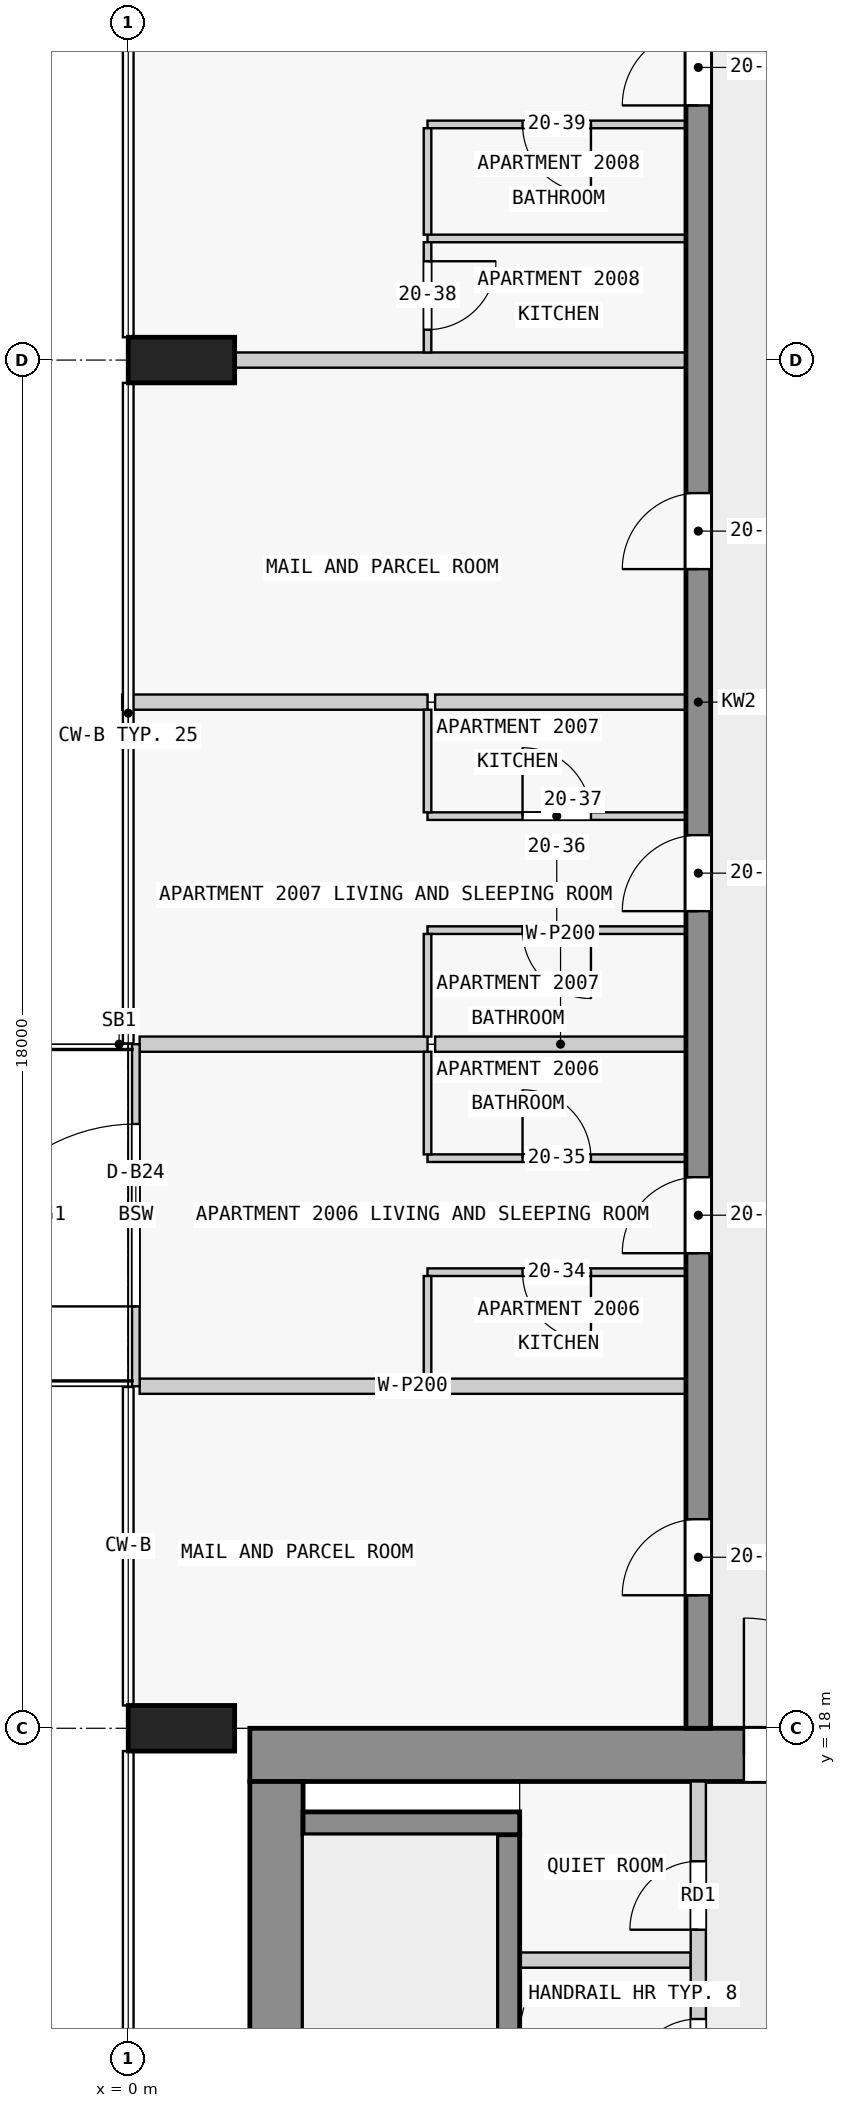
"""IFC4 building model, lengths in metres.
Left out: names, types, materials, properties, quantities, classifications, styles, units other than length and angle.
Written with IfcOpenShell. Run it as: python <this file> out.ifc"""

import sys

from ifc_helpers import new_model, si_unit, direction, frame, frame_2d, origin, origin_2d, place, context, subcontext, project, spatial, rectangle, extrude, element, fill, save


model = new_model("IFC4")
c1 = context("Model", 3, precision=1e-05, world=origin(), true_north=direction((0.0, 1.0)))
c2 = subcontext(c1, "Body", "Model", "MODEL_VIEW")
j1 = project(units=[si_unit("LENGTHUNIT", "METRE"), si_unit("PLANEANGLEUNIT", "RADIAN")], contexts=[c1])
p1 = place(None, origin())
s1 = spatial("IfcSite", under=j1, at=p1, CompositionType="ELEMENT")
p2 = place(p1, origin())
s2 = spatial("IfcBuilding", under=s1, at=p2, CompositionType="ELEMENT")
p3 = place(p2, frame((0.0, 0.0, 81.8)))
s3 = spatial("IfcBuildingStorey", under=s2, at=p3, CompositionType="ELEMENT", Elevation=81.8)
for number, where, z_axis, x_axis in (
    (1, (0.7, 36.0, 0.0), (0.0, 0.0, 1.0), (0.0, 1.0, 0.0)),
    (2, (0.7, 18.0, 0.0), (0.0, 0.0, 1.0), (0.0, 1.0, 0.0)),
):
    element("IfcColumn", number, at=place(p3, frame(where, z_axis=z_axis, x_axis=x_axis)), inside=s3, PredefinedType="COLUMN", context=c2, shape_type="SweptSolid", body=[
        extrude(rectangle(XDim=0.6, YDim=1.4, at=origin_2d()), origin(), (0.0, 0.0, 1.0), 3.5),
    ])
p4 = place(p3, frame((1.6, 17.65, 0.0), z_axis=(0.0, 0.0, 1.0), x_axis=(1.0, 0.0, 0.0)))
e3 = element("IfcWall", 3, at=p4, inside=s3, PredefinedType="SHEAR", context=c2, shape_type="SweptSolid", body=[
    extrude(rectangle(XDim=20.9, YDim=0.7, at=frame_2d((10.45, 0.0))), origin(), (0.0, 0.0, 1.0), 3.25),
])
p5 = place(p4, frame((6.5, 0.0, 0.0)))
e4 = element("IfcOpeningElement", 4, at=p5, cuts=e3, PredefinedType="OPENING", context=c2, shape_type="SweptSolid", body=[
    extrude(rectangle(XDim=1.8, YDim=2.1, at=frame_2d((0.9, 1.05))), frame((0.0, 0.36, 0.0), z_axis=(0.0, -1.0, 0.0), x_axis=(1.0, 0.0, 0.0)), (0.0, 0.0, 1.0), 0.72),
])
p6 = place(p3, frame((1.95, 2.5, 0.0), z_axis=(0.0, 0.0, 1.0), x_axis=(0.0, 1.0, 0.0)))
e5 = element("IfcWall", 5, at=p6, inside=s3, PredefinedType="SHEAR", context=c2, shape_type="SweptSolid", body=[
    extrude(rectangle(XDim=14.8, YDim=0.7, at=frame_2d((7.4, 0.0))), origin(), (0.0, 0.0, 1.0), 3.25),
])
p7 = place(p3, frame((5.0, 10.2, 0.0), z_axis=(0.0, 0.0, 1.0), x_axis=(0.0, 1.0, 0.0)))
e6 = element("IfcWall", 6, at=p7, inside=s3, PredefinedType="SHEAR", context=c2, shape_type="SweptSolid", body=[
    extrude(rectangle(XDim=6.4, YDim=0.3, at=frame_2d((3.2, 0.0))), origin(), (0.0, 0.0, 1.0), 3.25),
])
p8 = place(p3, frame((2.3, 16.75, 0.0), z_axis=(0.0, 0.0, 1.0), x_axis=(1.0, 0.0, 0.0)))
e7 = element("IfcWall", 7, at=p8, inside=s3, PredefinedType="SHEAR", context=c2, shape_type="SweptSolid", body=[
    extrude(rectangle(XDim=2.85, YDim=0.3, at=frame_2d((1.425, 0.0))), origin(), (0.0, 0.0, 1.0), 3.25),
])
p9 = place(p3, frame((7.5, 18.0, 0.0), z_axis=(0.0, 0.0, 1.0), x_axis=(0.0, 1.0, 0.0)))
e8 = element("IfcWall", 8, at=p9, inside=s3, PredefinedType="SHEAR", context=c2, shape_type="SweptSolid", body=[
    extrude(rectangle(XDim=27.0, YDim=0.325, at=frame_2d((13.5, 0.0))), origin(), (0.0, 0.0, 1.0), 3.25),
])
p10 = place(p9, frame((1.75, 0.0, 0.0)))
e9 = element("IfcOpeningElement", 9, at=p10, cuts=e8, PredefinedType="OPENING", context=c2, shape_type="SweptSolid", body=[
    extrude(rectangle(XDim=1.0, YDim=2.1, at=frame_2d((0.5, 1.05))), frame((0.0, 0.172, 0.0), z_axis=(0.0, -1.0, 0.0), x_axis=(1.0, 0.0, 0.0)), (0.0, 0.0, 1.0), 0.345),
])
p11 = place(p9, frame((6.25, 0.0, 0.0)))
e10 = element("IfcOpeningElement", 10, at=p11, cuts=e8, PredefinedType="OPENING", context=c2, shape_type="SweptSolid", body=[
    extrude(rectangle(XDim=1.0, YDim=2.1, at=frame_2d((0.5, 1.05))), frame((0.0, 0.172, 0.0), z_axis=(0.0, -1.0, 0.0), x_axis=(1.0, 0.0, 0.0)), (0.0, 0.0, 1.0), 0.345),
])
p12 = place(p9, frame((10.75, 0.0, 0.0)))
e11 = element("IfcOpeningElement", 11, at=p12, cuts=e8, PredefinedType="OPENING", context=c2, shape_type="SweptSolid", body=[
    extrude(rectangle(XDim=1.0, YDim=2.1, at=frame_2d((0.5, 1.05))), frame((0.0, 0.172, 0.0), z_axis=(0.0, -1.0, 0.0), x_axis=(1.0, 0.0, 0.0)), (0.0, 0.0, 1.0), 0.345),
])
p13 = place(p9, frame((15.25, 0.0, 0.0)))
e12 = element("IfcOpeningElement", 12, at=p13, cuts=e8, PredefinedType="OPENING", context=c2, shape_type="SweptSolid", body=[
    extrude(rectangle(XDim=1.0, YDim=2.1, at=frame_2d((0.5, 1.05))), frame((0.0, 0.172, 0.0), z_axis=(0.0, -1.0, 0.0), x_axis=(1.0, 0.0, 0.0)), (0.0, 0.0, 1.0), 0.345),
])
p14 = place(p9, frame((21.35, 0.0, 0.0)))
e13 = element("IfcOpeningElement", 13, at=p14, cuts=e8, PredefinedType="OPENING", context=c2, shape_type="SweptSolid", body=[
    extrude(rectangle(XDim=1.0, YDim=2.1, at=frame_2d((0.5, 1.05))), frame((0.0, 0.172, 0.0), z_axis=(0.0, -1.0, 0.0), x_axis=(1.0, 0.0, 0.0)), (0.0, 0.0, 1.0), 0.345),
])
p15 = place(p3, frame((0.1, 22.5, 0.0), z_axis=(0.0, 0.0, 1.0), x_axis=(0.0, 1.0, 0.0)))
e14 = element("IfcWall", 14, at=p15, inside=s3, PredefinedType="STANDARD", context=c2, shape_type="SweptSolid", body=[
    extrude(rectangle(XDim=4.5, YDim=0.1, at=frame_2d((2.25, 0.0))), origin(), (0.0, 0.0, 1.0), 3.25),
])
p16 = place(p15, frame((1.05, 0.0, 0.0)))
e15 = element("IfcOpeningElement", 15, at=p16, cuts=e14, PredefinedType="OPENING", context=c2, shape_type="SweptSolid", body=[
    extrude(rectangle(XDim=2.4, YDim=2.4, at=frame_2d((1.2, 1.2))), frame((0.0, 0.06, 0.0), z_axis=(0.0, -1.0, 0.0), x_axis=(1.0, 0.0, 0.0)), (0.0, 0.0, 1.0), 0.12),
])
p17 = place(p3, frame((7.5, 10.1, 0.0), z_axis=(0.0, 0.0, 1.0), x_axis=(0.0, 1.0, 0.0)))
e16 = element("IfcWall", 16, at=p17, inside=s3, PredefinedType="PARTITIONING", context=c2, shape_type="SweptSolid", body=[
    extrude(rectangle(XDim=7.2, YDim=0.2, at=frame_2d((3.6, 0.0))), origin(), (0.0, 0.0, 1.0), 3.25),
])
p18 = place(p17, frame((0.75, 0.0, 0.0)))
e17 = element("IfcOpeningElement", 17, at=p18, cuts=e16, PredefinedType="OPENING", context=c2, shape_type="SweptSolid", body=[
    extrude(rectangle(XDim=0.9, YDim=2.1, at=frame_2d((0.45, 1.05))), frame((0.0, 0.11, 0.0), z_axis=(0.0, -1.0, 0.0), x_axis=(1.0, 0.0, 0.0)), (0.0, 0.0, 1.0), 0.22),
])
p19 = place(p17, frame((3.175, 0.0, 0.0)))
e18 = element("IfcOpeningElement", 18, at=p19, cuts=e16, PredefinedType="OPENING", context=c2, shape_type="SweptSolid", body=[
    extrude(rectangle(XDim=0.9, YDim=2.1, at=frame_2d((0.45, 1.05))), frame((0.0, 0.11, 0.0), z_axis=(0.0, -1.0, 0.0), x_axis=(1.0, 0.0, 0.0)), (0.0, 0.0, 1.0), 0.22),
])
p20 = place(p17, frame((5.25, 0.0, 0.0)))
e19 = element("IfcOpeningElement", 19, at=p20, cuts=e16, PredefinedType="OPENING", context=c2, shape_type="SweptSolid", body=[
    extrude(rectangle(XDim=0.9, YDim=2.1, at=frame_2d((0.45, 1.05))), frame((0.0, 0.11, 0.0), z_axis=(0.0, -1.0, 0.0), x_axis=(1.0, 0.0, 0.0)), (0.0, 0.0, 1.0), 0.22),
])
p21 = place(p3, frame((5.15, 14.95, 0.0), z_axis=(0.0, 0.0, 1.0), x_axis=(1.0, 0.0, 0.0)))
e20 = element("IfcWall", 20, at=p21, inside=s3, PredefinedType="PARTITIONING", context=c2, shape_type="SweptSolid", body=[
    extrude(rectangle(XDim=2.25, YDim=0.2, at=frame_2d((1.125, 0.0))), origin(), (0.0, 0.0, 1.0), 3.25),
])
p22 = place(p3, frame((7.337, 22.5, 0.0), z_axis=(0.0, 0.0, 1.0), x_axis=(-1.0, 0.0, 0.0)))
e21 = element("IfcWall", 21, at=p22, inside=s3, PredefinedType="PARTITIONING", context=c2, shape_type="SweptSolid", body=[
    extrude(rectangle(XDim=7.188, YDim=0.2, at=frame_2d((3.594, 0.0))), origin(), (0.0, 0.0, 1.0), 3.25),
])
p23 = place(p3, frame((7.337, 24.0, 0.0), z_axis=(0.0, 0.0, 1.0), x_axis=(-1.0, 0.0, 0.0)))
e22 = element("IfcWall", 22, at=p23, inside=s3, PredefinedType="PARTITIONING", context=c2, shape_type="SweptSolid", body=[
    extrude(rectangle(XDim=3.4, YDim=0.1, at=frame_2d((1.7, 0.0))), origin(), (0.0, 0.0, 1.0), 3.25),
])
p24 = place(p23, frame((1.25, 0.0, 0.0)))
e23 = element("IfcOpeningElement", 23, at=p24, cuts=e22, PredefinedType="OPENING", context=c2, shape_type="SweptSolid", body=[
    extrude(rectangle(XDim=0.9, YDim=2.1, at=frame_2d((0.45, 1.05))), frame((0.0, 0.06, 0.0), z_axis=(0.0, -1.0, 0.0), x_axis=(1.0, 0.0, 0.0)), (0.0, 0.0, 1.0), 0.12),
])
p25 = place(p3, frame((3.938, 25.5, 0.0), z_axis=(0.0, 0.0, 1.0), x_axis=(1.0, 0.0, 0.0)))
e24 = element("IfcWall", 24, at=p25, inside=s3, PredefinedType="PARTITIONING", context=c2, shape_type="SweptSolid", body=[
    extrude(rectangle(XDim=3.4, YDim=0.1, at=frame_2d((1.7, 0.0))), origin(), (0.0, 0.0, 1.0), 3.25),
])
p26 = place(p25, frame((1.25, 0.0, 0.0)))
e25 = element("IfcOpeningElement", 25, at=p26, cuts=e24, PredefinedType="OPENING", context=c2, shape_type="SweptSolid", body=[
    extrude(rectangle(XDim=0.9, YDim=2.1, at=frame_2d((0.45, 1.05))), frame((0.0, 0.06, 0.0), z_axis=(0.0, -1.0, 0.0), x_axis=(1.0, 0.0, 0.0)), (0.0, 0.0, 1.0), 0.12),
])
p27 = place(p3, frame((7.337, 27.0, 0.0), z_axis=(0.0, 0.0, 1.0), x_axis=(-1.0, 0.0, 0.0)))
e26 = element("IfcWall", 26, at=p27, inside=s3, PredefinedType="PARTITIONING", context=c2, shape_type="SweptSolid", body=[
    extrude(rectangle(XDim=3.3, YDim=0.2, at=frame_2d((1.65, 0.0))), origin(), (0.0, 0.0, 1.0), 3.25),
])
p28 = place(p3, frame((0.15, 27.0, 0.0), z_axis=(0.0, 0.0, 1.0), x_axis=(1.0, 0.0, 0.0)))
e27 = element("IfcWall", 27, at=p28, inside=s3, PredefinedType="PARTITIONING", context=c2, shape_type="SweptSolid", body=[
    extrude(rectangle(XDim=3.788, YDim=0.2, at=frame_2d((1.894, 0.0))), origin(), (0.0, 0.0, 1.0), 3.25),
])
p29 = place(p3, frame((7.337, 28.5, 0.0), z_axis=(0.0, 0.0, 1.0), x_axis=(-1.0, 0.0, 0.0)))
e28 = element("IfcWall", 28, at=p29, inside=s3, PredefinedType="PARTITIONING", context=c2, shape_type="SweptSolid", body=[
    extrude(rectangle(XDim=3.4, YDim=0.1, at=frame_2d((1.7, 0.0))), origin(), (0.0, 0.0, 1.0), 3.25),
])
p30 = place(p29, frame((1.25, 0.0, 0.0)))
e29 = element("IfcOpeningElement", 29, at=p30, cuts=e28, PredefinedType="OPENING", context=c2, shape_type="SweptSolid", body=[
    extrude(rectangle(XDim=0.9, YDim=2.1, at=frame_2d((0.45, 1.05))), frame((0.0, 0.06, 0.0), z_axis=(0.0, -1.0, 0.0), x_axis=(1.0, 0.0, 0.0)), (0.0, 0.0, 1.0), 0.12),
])
p31 = place(p3, frame((3.938, 30.0, 0.0), z_axis=(0.0, 0.0, 1.0), x_axis=(1.0, 0.0, 0.0)))
e30 = element("IfcWall", 30, at=p31, inside=s3, PredefinedType="PARTITIONING", context=c2, shape_type="SweptSolid", body=[
    extrude(rectangle(XDim=3.4, YDim=0.1, at=frame_2d((1.7, 0.0))), origin(), (0.0, 0.0, 1.0), 3.25),
])
p32 = place(p31, frame((1.25, 0.0, 0.0)))
e31 = element("IfcOpeningElement", 31, at=p32, cuts=e30, PredefinedType="OPENING", context=c2, shape_type="SweptSolid", body=[
    extrude(rectangle(XDim=0.9, YDim=2.1, at=frame_2d((0.45, 1.05))), frame((0.0, 0.06, 0.0), z_axis=(0.0, -1.0, 0.0), x_axis=(1.0, 0.0, 0.0)), (0.0, 0.0, 1.0), 0.12),
])
p33 = place(p3, frame((7.337, 31.5, 0.0), z_axis=(0.0, 0.0, 1.0), x_axis=(-1.0, 0.0, 0.0)))
e32 = element("IfcWall", 32, at=p33, inside=s3, PredefinedType="PARTITIONING", context=c2, shape_type="SweptSolid", body=[
    extrude(rectangle(XDim=3.3, YDim=0.2, at=frame_2d((1.65, 0.0))), origin(), (0.0, 0.0, 1.0), 3.25),
])
p34 = place(p3, frame((-0.08, 31.5, 0.0), z_axis=(0.0, 0.0, 1.0), x_axis=(1.0, 0.0, 0.0)))
e33 = element("IfcWall", 33, at=p34, inside=s3, PredefinedType="PARTITIONING", context=c2, shape_type="SweptSolid", body=[
    extrude(rectangle(XDim=4.018, YDim=0.2, at=frame_2d((2.009, 0.0))), origin(), (0.0, 0.0, 1.0), 3.25),
])
p35 = place(p3, frame((7.337, 36.0, 0.0), z_axis=(0.0, 0.0, 1.0), x_axis=(-1.0, 0.0, 0.0)))
e34 = element("IfcWall", 34, at=p35, inside=s3, PredefinedType="PARTITIONING", context=c2, shape_type="SweptSolid", body=[
    extrude(rectangle(XDim=5.938, YDim=0.2, at=frame_2d((2.969, 0.0))), origin(), (0.0, 0.0, 1.0), 3.25),
])
p36 = place(p3, frame((7.337, 37.6, 0.0), z_axis=(0.0, 0.0, 1.0), x_axis=(-1.0, 0.0, 0.0)))
e35 = element("IfcWall", 35, at=p36, inside=s3, PredefinedType="PARTITIONING", context=c2, shape_type="SweptSolid", body=[
    extrude(rectangle(XDim=3.4, YDim=0.1, at=frame_2d((1.7, 0.0))), origin(), (0.0, 0.0, 1.0), 3.25),
])
p37 = place(p3, frame((7.337, 39.1, 0.0), z_axis=(0.0, 0.0, 1.0), x_axis=(-1.0, 0.0, 0.0)))
e36 = element("IfcWall", 36, at=p37, inside=s3, PredefinedType="PARTITIONING", context=c2, shape_type="SweptSolid", body=[
    extrude(rectangle(XDim=3.4, YDim=0.1, at=frame_2d((1.7, 0.0))), origin(), (0.0, 0.0, 1.0), 3.25),
])
p38 = place(p37, frame((1.25, 0.0, 0.0)))
e37 = element("IfcOpeningElement", 37, at=p38, cuts=e36, PredefinedType="OPENING", context=c2, shape_type="SweptSolid", body=[
    extrude(rectangle(XDim=0.9, YDim=2.1, at=frame_2d((0.45, 1.05))), frame((0.0, 0.06, 0.0), z_axis=(0.0, -1.0, 0.0), x_axis=(1.0, 0.0, 0.0)), (0.0, 0.0, 1.0), 0.12),
])
for number, where, z_axis, x_axis in (
    (38, (3.938, 23.95, 0.0), (0.0, 0.0, 1.0), (0.0, -1.0, 0.0)),
    (39, (3.938, 26.9, 0.0), (0.0, 0.0, 1.0), (0.0, -1.0, 0.0)),
    (40, (3.938, 28.45, 0.0), (0.0, 0.0, 1.0), (0.0, -1.0, 0.0)),
    (41, (3.938, 31.4, 0.0), (0.0, 0.0, 1.0), (0.0, -1.0, 0.0)),
):
    element("IfcWall", number, at=place(p3, frame(where, z_axis=z_axis, x_axis=x_axis)), inside=s3, PredefinedType="PARTITIONING", context=c2, shape_type="SweptSolid", body=[
        extrude(rectangle(XDim=1.35, YDim=0.1, at=frame_2d((0.675, 0.0))), origin(), (0.0, 0.0, 1.0), 3.25),
    ])
p39 = place(p3, frame((3.938, 37.55, 0.0), z_axis=(0.0, 0.0, 1.0), x_axis=(0.0, -1.0, 0.0)))
e42 = element("IfcWall", 42, at=p39, inside=s3, PredefinedType="PARTITIONING", context=c2, shape_type="SweptSolid", body=[
    extrude(rectangle(XDim=1.45, YDim=0.1, at=frame_2d((0.725, 0.0))), origin(), (0.0, 0.0, 1.0), 3.25),
])
p40 = place(p39, frame((0.25, 0.0, 0.0)))
e43 = element("IfcOpeningElement", 43, at=p40, cuts=e42, PredefinedType="OPENING", context=c2, shape_type="SweptSolid", body=[
    extrude(rectangle(XDim=0.9, YDim=2.1, at=frame_2d((0.45, 1.05))), frame((0.0, 0.06, 0.0), z_axis=(0.0, -1.0, 0.0), x_axis=(1.0, 0.0, 0.0)), (0.0, 0.0, 1.0), 0.12),
])
p41 = place(p3, frame((3.938, 39.05, 0.0), z_axis=(0.0, 0.0, 1.0), x_axis=(0.0, -1.0, 0.0)))
e44 = element("IfcWall", 44, at=p41, inside=s3, PredefinedType="PARTITIONING", context=c2, shape_type="SweptSolid", body=[
    extrude(rectangle(XDim=1.4, YDim=0.1, at=frame_2d((0.7, 0.0))), origin(), (0.0, 0.0, 1.0), 3.25),
])
p42 = place(p16, origin())
e45 = element("IfcDoor", 45, at=p42, inside=s3, OperationType="SINGLE_SWING_LEFT", PredefinedType="DOOR", context=c2, shape_type="SweptSolid", body=[
    extrude(rectangle(XDim=2.4, YDim=2.4, at=frame_2d((1.2, 1.2))), frame((0.0, 0.025, 0.0), z_axis=(0.0, -1.0, 0.0), x_axis=(1.0, 0.0, 0.0)), (0.0, 0.0, 1.0), 0.05),
])
fill(e15, e45)
p43 = place(p5, origin())
e46 = element("IfcDoor", 46, at=p43, inside=s3, OperationType="DOUBLE_DOOR_SINGLE_SWING", PredefinedType="DOOR", context=c2, shape_type="SweptSolid", body=[
    extrude(rectangle(XDim=1.8, YDim=2.1, at=frame_2d((0.9, 1.05))), frame((0.0, 0.025, 0.0), z_axis=(0.0, -1.0, 0.0), x_axis=(1.0, 0.0, 0.0)), (0.0, 0.0, 1.0), 0.05),
])
fill(e4, e46)
p44 = place(p19, origin())
e47 = element("IfcDoor", 47, at=p44, inside=s3, OperationType="SINGLE_SWING_RIGHT", PredefinedType="DOOR", context=c2, shape_type="SweptSolid", body=[
    extrude(rectangle(XDim=0.9, YDim=2.1, at=frame_2d((0.45, 1.05))), frame((0.0, 0.025, 0.0), z_axis=(0.0, -1.0, 0.0), x_axis=(1.0, 0.0, 0.0)), (0.0, 0.0, 1.0), 0.05),
])
fill(e18, e47)
p45 = place(p20, origin())
e48 = element("IfcDoor", 48, at=p45, inside=s3, OperationType="SINGLE_SWING_RIGHT", PredefinedType="DOOR", context=c2, shape_type="SweptSolid", body=[
    extrude(rectangle(XDim=0.9, YDim=2.1, at=frame_2d((0.45, 1.05))), frame((0.0, 0.025, 0.0), z_axis=(0.0, -1.0, 0.0), x_axis=(1.0, 0.0, 0.0)), (0.0, 0.0, 1.0), 0.05),
])
fill(e19, e48)
p46 = place(p10, origin())
e49 = element("IfcDoor", 49, at=p46, inside=s3, OperationType="SINGLE_SWING_LEFT", PredefinedType="DOOR", context=c2, shape_type="SweptSolid", body=[
    extrude(rectangle(XDim=1.0, YDim=2.1, at=frame_2d((0.5, 1.05))), frame((0.0, 0.025, 0.0), z_axis=(0.0, -1.0, 0.0), x_axis=(1.0, 0.0, 0.0)), (0.0, 0.0, 1.0), 0.05),
])
fill(e9, e49)
p47 = place(p11, origin())
e50 = element("IfcDoor", 50, at=p47, inside=s3, OperationType="SINGLE_SWING_LEFT", PredefinedType="DOOR", context=c2, shape_type="SweptSolid", body=[
    extrude(rectangle(XDim=1.0, YDim=2.1, at=frame_2d((0.5, 1.05))), frame((0.0, 0.025, 0.0), z_axis=(0.0, -1.0, 0.0), x_axis=(1.0, 0.0, 0.0)), (0.0, 0.0, 1.0), 0.05),
])
fill(e10, e50)
p48 = place(p12, origin())
e51 = element("IfcDoor", 51, at=p48, inside=s3, OperationType="SINGLE_SWING_LEFT", PredefinedType="DOOR", context=c2, shape_type="SweptSolid", body=[
    extrude(rectangle(XDim=1.0, YDim=2.1, at=frame_2d((0.5, 1.05))), frame((0.0, 0.025, 0.0), z_axis=(0.0, -1.0, 0.0), x_axis=(1.0, 0.0, 0.0)), (0.0, 0.0, 1.0), 0.05),
])
fill(e11, e51)
p49 = place(p13, origin())
e52 = element("IfcDoor", 52, at=p49, inside=s3, OperationType="SINGLE_SWING_RIGHT", PredefinedType="DOOR", context=c2, shape_type="SweptSolid", body=[
    extrude(rectangle(XDim=1.0, YDim=2.1, at=frame_2d((0.5, 1.05))), frame((0.0, 0.025, 0.0), z_axis=(0.0, -1.0, 0.0), x_axis=(1.0, 0.0, 0.0)), (0.0, 0.0, 1.0), 0.05),
])
fill(e12, e52)
p50 = place(p14, origin())
e53 = element("IfcDoor", 53, at=p50, inside=s3, OperationType="SINGLE_SWING_RIGHT", PredefinedType="DOOR", context=c2, shape_type="SweptSolid", body=[
    extrude(rectangle(XDim=1.0, YDim=2.1, at=frame_2d((0.5, 1.05))), frame((0.0, 0.025, 0.0), z_axis=(0.0, -1.0, 0.0), x_axis=(1.0, 0.0, 0.0)), (0.0, 0.0, 1.0), 0.05),
])
fill(e13, e53)
p51 = place(p24, origin())
e54 = element("IfcDoor", 54, at=p51, inside=s3, OperationType="SINGLE_SWING_LEFT", PredefinedType="DOOR", context=c2, shape_type="SweptSolid", body=[
    extrude(rectangle(XDim=0.9, YDim=2.1, at=frame_2d((0.45, 1.05))), frame((0.0, 0.025, 0.0), z_axis=(0.0, -1.0, 0.0), x_axis=(1.0, 0.0, 0.0)), (0.0, 0.0, 1.0), 0.05),
])
fill(e23, e54)
p52 = place(p26, origin())
e55 = element("IfcDoor", 55, at=p52, inside=s3, OperationType="SINGLE_SWING_LEFT", PredefinedType="DOOR", context=c2, shape_type="SweptSolid", body=[
    extrude(rectangle(XDim=0.9, YDim=2.1, at=frame_2d((0.45, 1.05))), frame((0.0, 0.025, 0.0), z_axis=(0.0, -1.0, 0.0), x_axis=(1.0, 0.0, 0.0)), (0.0, 0.0, 1.0), 0.05),
])
fill(e25, e55)
p53 = place(p30, origin())
e56 = element("IfcDoor", 56, at=p53, inside=s3, OperationType="SINGLE_SWING_LEFT", PredefinedType="DOOR", context=c2, shape_type="SweptSolid", body=[
    extrude(rectangle(XDim=0.9, YDim=2.1, at=frame_2d((0.45, 1.05))), frame((0.0, 0.025, 0.0), z_axis=(0.0, -1.0, 0.0), x_axis=(1.0, 0.0, 0.0)), (0.0, 0.0, 1.0), 0.05),
])
fill(e29, e56)
p54 = place(p32, origin())
e57 = element("IfcDoor", 57, at=p54, inside=s3, OperationType="SINGLE_SWING_LEFT", PredefinedType="DOOR", context=c2, shape_type="SweptSolid", body=[
    extrude(rectangle(XDim=0.9, YDim=2.1, at=frame_2d((0.45, 1.05))), frame((0.0, 0.025, 0.0), z_axis=(0.0, -1.0, 0.0), x_axis=(1.0, 0.0, 0.0)), (0.0, 0.0, 1.0), 0.05),
])
fill(e31, e57)
p55 = place(p40, origin())
e58 = element("IfcDoor", 58, at=p55, inside=s3, OperationType="SINGLE_SWING_LEFT", PredefinedType="DOOR", context=c2, shape_type="SweptSolid", body=[
    extrude(rectangle(XDim=0.9, YDim=2.1, at=frame_2d((0.45, 1.05))), frame((0.0, 0.025, 0.0), z_axis=(0.0, -1.0, 0.0), x_axis=(1.0, 0.0, 0.0)), (0.0, 0.0, 1.0), 0.05),
])
fill(e43, e58)
p56 = place(p38, origin())
e59 = element("IfcDoor", 59, at=p56, inside=s3, OperationType="SINGLE_SWING_LEFT", PredefinedType="DOOR", context=c2, shape_type="SweptSolid", body=[
    extrude(rectangle(XDim=0.9, YDim=2.1, at=frame_2d((0.45, 1.05))), frame((0.0, 0.025, 0.0), z_axis=(0.0, -1.0, 0.0), x_axis=(1.0, 0.0, 0.0)), (0.0, 0.0, 1.0), 0.05),
])
fill(e37, e59)
save(model, sys.argv[1])
